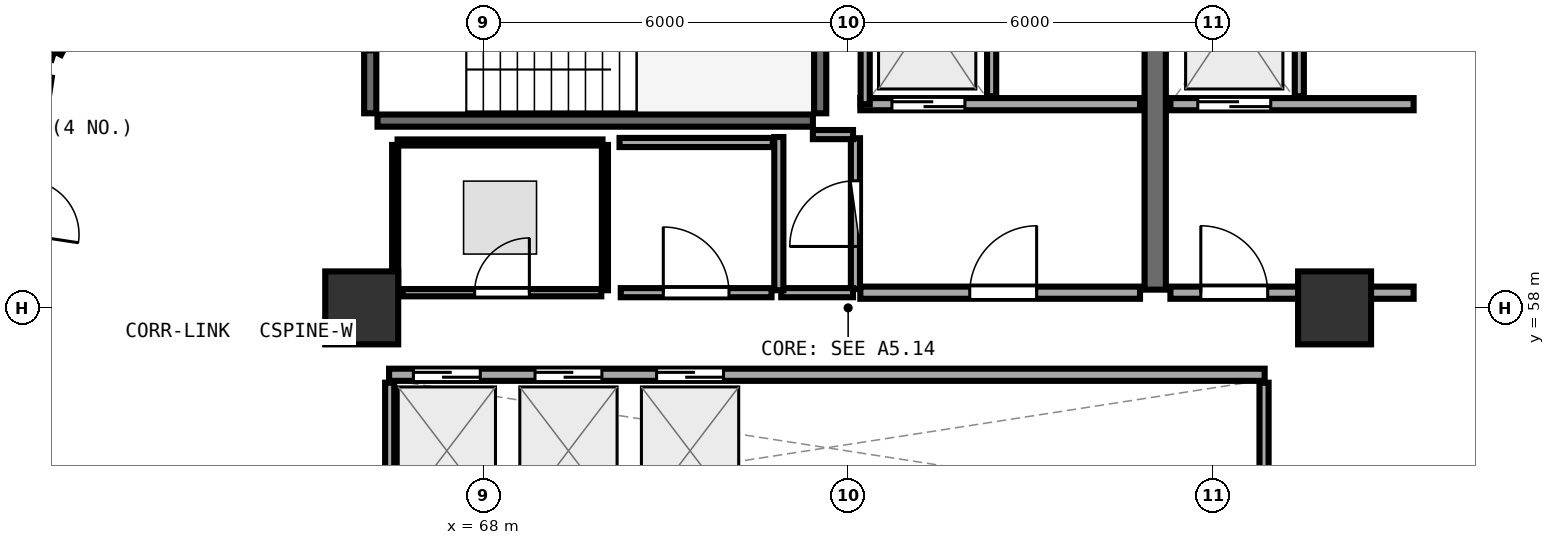
"""IFC4 building model, lengths in metres.
Left out: names, types, materials, properties, quantities, classifications, styles, units other than length and angle.
Written with IfcOpenShell. Run it as: python <this file> out.ifc"""

import sys

from ifc_helpers import new_model, si_unit, direction, frame, frame_2d, origin, origin_2d, place, context, subcontext, project, spatial, rectangle, extrude, element, fill, save


model = new_model("IFC4")
c1 = context("Model", 3, precision=1e-05, world=origin(), true_north=direction((0.0, 1.0)))
c2 = subcontext(c1, "Body", "Model", "MODEL_VIEW")
j1 = project(units=[si_unit("LENGTHUNIT", "METRE"), si_unit("PLANEANGLEUNIT", "RADIAN")], contexts=[c1])
p1 = place(None, origin())
s1 = spatial("IfcSite", under=j1, at=p1, CompositionType="ELEMENT")
p2 = place(p1, origin())
s2 = spatial("IfcBuilding", under=s1, at=p2, CompositionType="ELEMENT")
p3 = place(p2, frame((0.0, 0.0, 146.85)))
s3 = spatial("IfcBuildingStorey", under=s2, at=p3, CompositionType="ELEMENT", Elevation=146.85)
for number, where, z_axis, x_axis in (
    (1, (82.0, 58.0, 0.0), (0.0, 0.0, 1.0), (1.0, 0.0, 0.0)),
    (2, (66.0, 58.0, 0.0), (0.0, 0.0, 1.0), (1.0, 0.0, 0.0)),
):
    element("IfcColumn", number, at=place(p3, frame(where, z_axis=z_axis, x_axis=x_axis)), inside=s3, PredefinedType="PILASTER", context=c2, shape_type="SweptSolid", body=[
        extrude(rectangle(XDim=1.2, YDim=1.2, at=origin_2d()), origin(), (0.0, 0.0, 1.0), 3.75),
    ])
p4 = place(p3, frame((66.26, 61.08, 0.0), z_axis=(0.0, 0.0, 1.0), x_axis=(1.0, 0.0, 0.0)))
e3 = element("IfcWall", 3, at=p4, inside=s3, PredefinedType="SHEAR", context=c2, shape_type="SweptSolid", body=[
    extrude(rectangle(XDim=7.16, YDim=0.2, at=frame_2d((3.58, 0.0))), origin(), (0.0, 0.0, 1.0), 3.49),
])
p5 = place(p3, frame((73.54, 61.2, 0.0), z_axis=(0.0, 0.0, 1.0), x_axis=(0.0, 1.0, 0.0)))
e4 = element("IfcWall", 4, at=p5, inside=s3, PredefinedType="SHEAR", context=c2, shape_type="SweptSolid", body=[
    extrude(rectangle(XDim=3.07, YDim=0.2, at=frame_2d((1.535, 0.0))), origin(), (0.0, 0.0, 1.0), 3.49),
])
p6 = place(p3, frame((66.14, 64.27, 0.0), z_axis=(0.0, 0.0, 1.0), x_axis=(0.0, -1.0, 0.0)))
e5 = element("IfcWall", 5, at=p6, inside=s3, PredefinedType="SHEAR", context=c2, shape_type="SweptSolid", body=[
    extrude(rectangle(XDim=3.07, YDim=0.2, at=frame_2d((1.535, 0.0))), origin(), (0.0, 0.0, 1.0), 3.49),
])
p7 = place(p6, frame((1.01, 0.0, 0.0)))
e6 = element("IfcOpeningElement", 6, at=p7, cuts=e5, PredefinedType="OPENING", context=c2, shape_type="SweptSolid", body=[
    extrude(rectangle(XDim=1.05, YDim=2.1, at=frame_2d((0.525, 1.05))), frame((0.0, 0.11, 0.0), z_axis=(0.0, -1.0, 0.0), x_axis=(1.0, 0.0, 0.0)), (0.0, 0.0, 1.0), 0.22),
])
p8 = place(p3, frame((79.05, 58.3, 0.0), z_axis=(0.0, 0.0, 1.0), x_axis=(0.0, 1.0, 0.0)))
e7 = element("IfcWall", 7, at=p8, inside=s3, PredefinedType="SHEAR", context=c2, shape_type="SweptSolid", body=[
    extrude(rectangle(XDim=6.3, YDim=0.35, at=frame_2d((3.15, 0.0))), origin(), (0.0, 0.0, 1.0), 3.49),
])
p9 = place(p3, frame((74.2, 61.35, 0.0), z_axis=(0.0, 0.0, 1.0), x_axis=(1.0, 0.0, 0.0)))
e8 = element("IfcWall", 8, at=p9, inside=s3, PredefinedType="SOLIDWALL", context=c2, shape_type="SweptSolid", body=[
    extrude(rectangle(XDim=4.6, YDim=0.2, at=frame_2d((2.3, 0.0))), origin(), (0.0, 0.0, 1.0), 3.48),
])
p10 = place(p9, frame((0.52, 0.0, 0.0)))
e9 = element("IfcOpeningElement", 9, at=p10, cuts=e8, PredefinedType="OPENING", context=c2, shape_type="SweptSolid", body=[
    extrude(rectangle(XDim=1.2, YDim=2.15, at=frame_2d((0.6, 1.075))), frame((0.0, 0.11, 0.0), z_axis=(0.0, -1.0, 0.0), x_axis=(1.0, 0.0, 0.0)), (0.0, 0.0, 1.0), 0.22),
])
p11 = place(p3, frame((74.28, 61.35, 0.0), z_axis=(0.0, 0.0, 1.0), x_axis=(0.0, 1.0, 0.0)))
e10 = element("IfcWall", 10, at=p11, inside=s3, PredefinedType="PARTITIONING", context=c2, shape_type="SweptSolid", body=[
    extrude(rectangle(XDim=2.97, YDim=0.15, at=frame_2d((1.485, 0.0))), origin(), (0.0, 0.0, 1.0), 3.48),
])
p12 = place(p3, frame((76.36, 61.48, 0.0), z_axis=(0.0, 0.0, 1.0), x_axis=(0.0, 1.0, 0.0)))
e11 = element("IfcWall", 11, at=p12, inside=s3, PredefinedType="PARTITIONING", context=c2, shape_type="SweptSolid", body=[
    extrude(rectangle(XDim=2.84, YDim=0.15, at=frame_2d((1.42, 0.0))), origin(), (0.0, 0.0, 1.0), 3.48),
])
p13 = place(p3, frame((79.3, 61.35, 0.0), z_axis=(0.0, 0.0, 1.0), x_axis=(1.0, 0.0, 0.0)))
e12 = element("IfcWall", 12, at=p13, inside=s3, PredefinedType="SOLIDWALL", context=c2, shape_type="SweptSolid", body=[
    extrude(rectangle(XDim=4.0, YDim=0.2, at=frame_2d((2.0, 0.0))), origin(), (0.0, 0.0, 1.0), 2.775),
])
p14 = place(p13, frame((0.45, 0.0, 0.0)))
e13 = element("IfcOpeningElement", 13, at=p14, cuts=e12, PredefinedType="OPENING", context=c2, shape_type="SweptSolid", body=[
    extrude(rectangle(XDim=1.2, YDim=2.15, at=frame_2d((0.6, 1.075))), frame((0.0, 0.11, 0.0), z_axis=(0.0, -1.0, 0.0), x_axis=(1.0, 0.0, 0.0)), (0.0, 0.0, 1.0), 0.22),
])
p15 = place(p3, frame((81.42, 61.48, 0.0), z_axis=(0.0, 0.0, 1.0), x_axis=(0.0, 1.0, 0.0)))
e14 = element("IfcWall", 14, at=p15, inside=s3, PredefinedType="PARTITIONING", context=c2, shape_type="SweptSolid", body=[
    extrude(rectangle(XDim=2.84, YDim=0.15, at=frame_2d((1.42, 0.0))), origin(), (0.0, 0.0, 1.0), 3.48),
])
p16 = place(p3, frame((74.2, 58.25, 0.0), z_axis=(0.0, 0.0, 1.0), x_axis=(1.0, 0.0, 0.0)))
e15 = element("IfcWall", 15, at=p16, inside=s3, PredefinedType="SOLIDWALL", context=c2, shape_type="SweptSolid", body=[
    extrude(rectangle(XDim=4.6, YDim=0.2, at=frame_2d((2.3, 0.0))), origin(), (0.0, 0.0, 1.0), 3.48),
])
p17 = place(p16, frame((1.8, 0.0, 0.0)))
e16 = element("IfcOpeningElement", 16, at=p17, cuts=e15, PredefinedType="OPENING", context=c2, shape_type="SweptSolid", body=[
    extrude(rectangle(XDim=1.1, YDim=2.1, at=frame_2d((0.55, 1.05))), frame((0.0, 0.11, 0.0), z_axis=(0.0, -1.0, 0.0), x_axis=(1.0, 0.0, 0.0)), (0.0, 0.0, 1.0), 0.22),
])
p18 = place(p3, frame((79.3, 58.25, 0.0), z_axis=(0.0, 0.0, 1.0), x_axis=(1.0, 0.0, 0.0)))
e17 = element("IfcWall", 17, at=p18, inside=s3, PredefinedType="SOLIDWALL", context=c2, shape_type="SweptSolid", body=[
    extrude(rectangle(XDim=4.0, YDim=0.2, at=frame_2d((2.0, 0.0))), origin(), (0.0, 0.0, 1.0), 2.775),
])
p19 = place(p18, frame((0.5, 0.0, 0.0)))
e18 = element("IfcOpeningElement", 18, at=p19, cuts=e17, PredefinedType="OPENING", context=c2, shape_type="SweptSolid", body=[
    extrude(rectangle(XDim=1.1, YDim=2.1, at=frame_2d((0.55, 1.05))), frame((0.0, 0.11, 0.0), z_axis=(0.0, -1.0, 0.0), x_axis=(1.0, 0.0, 0.0)), (0.0, 0.0, 1.0), 0.22),
])
p20 = place(p3, frame((66.45, 56.9, 0.0), z_axis=(0.0, 0.0, 1.0), x_axis=(1.0, 0.0, 0.0)))
e19 = element("IfcWall", 19, at=p20, inside=s3, PredefinedType="SOLIDWALL", context=c2, shape_type="SweptSolid", body=[
    extrude(rectangle(XDim=14.4, YDim=0.2, at=frame_2d((7.2, 0.0))), origin(), (0.0, 0.0, 1.0), 3.48),
])
p21 = place(p20, frame((0.4, 0.0, 0.0)))
e20 = element("IfcOpeningElement", 20, at=p21, cuts=e19, PredefinedType="OPENING", context=c2, shape_type="SweptSolid", body=[
    extrude(rectangle(XDim=1.1, YDim=2.1, at=frame_2d((0.55, 1.05))), frame((0.0, 0.11, 0.0), z_axis=(0.0, -1.0, 0.0), x_axis=(1.0, 0.0, 0.0)), (0.0, 0.0, 1.0), 0.22),
])
p22 = place(p20, frame((2.4, 0.0, 0.0)))
e21 = element("IfcOpeningElement", 21, at=p22, cuts=e19, PredefinedType="OPENING", context=c2, shape_type="SweptSolid", body=[
    extrude(rectangle(XDim=1.1, YDim=2.1, at=frame_2d((0.55, 1.05))), frame((0.0, 0.11, 0.0), z_axis=(0.0, -1.0, 0.0), x_axis=(1.0, 0.0, 0.0)), (0.0, 0.0, 1.0), 0.22),
])
p23 = place(p20, frame((4.4, 0.0, 0.0)))
e22 = element("IfcOpeningElement", 22, at=p23, cuts=e19, PredefinedType="OPENING", context=c2, shape_type="SweptSolid", body=[
    extrude(rectangle(XDim=1.1, YDim=2.1, at=frame_2d((0.55, 1.05))), frame((0.0, 0.11, 0.0), z_axis=(0.0, -1.0, 0.0), x_axis=(1.0, 0.0, 0.0)), (0.0, 0.0, 1.0), 0.22),
])
for number, where, z_axis, x_axis in (
    (23, (66.46, 54.48, 0.0), (0.0, 0.0, 1.0), (0.0, 1.0, 0.0)),
    (24, (80.84, 54.48, 0.0), (0.0, 0.0, 1.0), (0.0, 1.0, 0.0)),
):
    element("IfcWall", number, at=place(p3, frame(where, z_axis=z_axis, x_axis=x_axis)), inside=s3, PredefinedType="PARTITIONING", context=c2, shape_type="SweptSolid", body=[
        extrude(rectangle(XDim=2.29, YDim=0.15, at=frame_2d((1.145, 0.0))), origin(), (0.0, 0.0, 1.0), 3.48),
    ])
p24 = place(p3, frame((74.12, 58.31, 0.0), z_axis=(0.0, 0.0, 1.0), x_axis=(0.0, 1.0, 0.0)))
e25 = element("IfcWall", 25, at=p24, inside=s3, PredefinedType="PARTITIONING", context=c2, shape_type="SweptSolid", body=[
    extrude(rectangle(XDim=2.48, YDim=0.15, at=frame_2d((1.24, 0.0))), origin(), (0.0, 0.0, 1.0), 3.48),
])
p25 = place(p24, frame((0.7, 0.0, 0.0)))
e26 = element("IfcOpeningElement", 26, at=p25, cuts=e25, PredefinedType="OPENING", context=c2, shape_type="SweptSolid", body=[
    extrude(rectangle(XDim=1.08, YDim=2.1, at=frame_2d((0.54, 1.05))), frame((0.0, 0.085, 0.0), z_axis=(0.0, -1.0, 0.0), x_axis=(1.0, 0.0, 0.0)), (0.0, 0.0, 1.0), 0.17),
])
p26 = place(p3, frame((66.675, 58.25, 0.0), z_axis=(0.0, 0.0, 1.0), x_axis=(1.0, 0.0, 0.0)))
e27 = element("IfcWall", 27, at=p26, inside=s3, PredefinedType="PARTITIONING", context=c2, shape_type="SweptSolid", body=[
    extrude(rectangle(XDim=3.265, YDim=0.12, at=frame_2d((1.632, 0.0))), origin(), (0.0, 0.0, 1.0), 3.48),
])
p27 = place(p26, frame((1.182, 0.0, 0.0)))
e28 = element("IfcOpeningElement", 28, at=p27, cuts=e27, PredefinedType="OPENING", context=c2, shape_type="SweptSolid", body=[
    extrude(rectangle(XDim=0.9, YDim=2.08, at=frame_2d((0.45, 1.04))), frame((0.0, 0.07, 0.0), z_axis=(0.0, -1.0, 0.0), x_axis=(1.0, 0.0, 0.0)), (0.0, 0.0, 1.0), 0.14),
])
p28 = place(p3, frame((70.26, 58.25, 0.0), z_axis=(0.0, 0.0, 1.0), x_axis=(1.0, 0.0, 0.0)))
e29 = element("IfcWall", 29, at=p28, inside=s3, PredefinedType="PARTITIONING", context=c2, shape_type="SweptSolid", body=[
    extrude(rectangle(XDim=2.48, YDim=0.15, at=frame_2d((1.24, 0.0))), origin(), (0.0, 0.0, 1.0), 3.48),
])
p29 = place(p28, frame((0.7, 0.0, 0.0)))
e30 = element("IfcOpeningElement", 30, at=p29, cuts=e29, PredefinedType="OPENING", context=c2, shape_type="SweptSolid", body=[
    extrude(rectangle(XDim=1.08, YDim=2.1, at=frame_2d((0.54, 1.05))), frame((0.0, 0.085, 0.0), z_axis=(0.0, -1.0, 0.0), x_axis=(1.0, 0.0, 0.0)), (0.0, 0.0, 1.0), 0.17),
])
p30 = place(p3, frame((62.015, 64.192, 0.0), z_axis=(0.0, 0.0, 1.0), x_axis=(-0.457234963971, -0.889345932538, 0.0)))
e31 = element("IfcWall", 31, at=p30, inside=s3, PredefinedType="PARTITIONING", context=c2, shape_type="SweptSolid", body=[
    extrude(rectangle(XDim=2.245, YDim=0.15, at=frame_2d((1.122, 0.0))), origin(), (0.0, 0.0, 1.0), 3.235),
])
p31 = place(p30, frame((0.647, 0.0, 0.0)))
e32 = element("IfcOpeningElement", 32, at=p31, cuts=e31, PredefinedType="OPENING", context=c2, shape_type="SweptSolid", body=[
    extrude(rectangle(XDim=0.95, YDim=2.08, at=frame_2d((0.475, 1.04))), frame((0.0, 0.085, 0.0), z_axis=(0.0, -1.0, 0.0), x_axis=(1.0, 0.0, 0.0)), (0.0, 0.0, 1.0), 0.17),
])
p32 = place(p3, frame((60.843, 61.796, 0.0), z_axis=(0.0, 0.0, 1.0), x_axis=(-0.149807046494, -0.988715251638, 0.0)))
e33 = element("IfcWall", 33, at=p32, inside=s3, PredefinedType="PARTITIONING", context=c2, shape_type="SweptSolid", body=[
    extrude(rectangle(XDim=4.338, YDim=0.12, at=frame_2d((2.169, 0.0))), origin(), (0.0, 0.0, 1.0), 2.975),
])
p33 = place(p32, frame((1.719, 0.0, 0.0)))
e34 = element("IfcOpeningElement", 34, at=p33, cuts=e33, PredefinedType="OPENING", context=c2, shape_type="SweptSolid", body=[
    extrude(rectangle(XDim=0.9, YDim=2.08, at=frame_2d((0.45, 1.04))), frame((0.0, 0.07, 0.0), z_axis=(0.0, -1.0, 0.0), x_axis=(1.0, 0.0, 0.0)), (0.0, 0.0, 1.0), 0.14),
])
p34 = place(p3, frame((72.9, 58.25, 0.0), z_axis=(0.0, 0.0, 1.0), x_axis=(1.0, 0.0, 0.0)))
e35 = element("IfcWall", 35, at=p34, inside=s3, PredefinedType="PARTITIONING", context=c2, shape_type="SweptSolid", body=[
    extrude(rectangle(XDim=1.18, YDim=0.15, at=frame_2d((0.59, 0.0))), origin(), (0.0, 0.0, 1.0), 3.48),
])
p35 = place(p3, frame((74.08, 60.85, 0.0), z_axis=(0.0, 0.0, 1.0), x_axis=(-1.0, 0.0, 0.0)))
e36 = element("IfcWall", 36, at=p35, inside=s3, PredefinedType="PARTITIONING", context=c2, shape_type="SweptSolid", body=[
    extrude(rectangle(XDim=0.66, YDim=0.15, at=frame_2d((0.33, 0.0))), origin(), (0.0, 0.0, 1.0), 3.48),
])
p36 = place(p3, frame((72.86, 60.81, 0.0), z_axis=(0.0, 0.0, 1.0), x_axis=(0.0, -1.0, 0.0)))
e37 = element("IfcWall", 37, at=p36, inside=s3, PredefinedType="PARTITIONING", context=c2, shape_type="SweptSolid", body=[
    extrude(rectangle(XDim=2.52, YDim=0.15, at=frame_2d((1.26, 0.0))), origin(), (0.0, 0.0, 1.0), 3.48),
])
p37 = place(p3, frame((70.0, 58.29, 0.0), z_axis=(0.0, 0.0, 1.0), x_axis=(0.0, 1.0, 0.0)))
e38 = element("IfcWall", 38, at=p37, inside=s3, PredefinedType="PARTITIONING", context=c2, shape_type="SweptSolid", body=[
    extrude(rectangle(XDim=2.39, YDim=0.1, at=frame_2d((1.195, 0.0))), origin(), (0.0, 0.0, 1.0), 3.48),
])
p38 = place(p3, frame((69.96, 60.72, 0.0), z_axis=(0.0, 0.0, 1.0), x_axis=(-1.0, 0.0, 0.0)))
e39 = element("IfcWall", 39, at=p38, inside=s3, PredefinedType="PARTITIONING", context=c2, shape_type="SweptSolid", body=[
    extrude(rectangle(XDim=3.37, YDim=0.1, at=frame_2d((1.685, 0.0))), origin(), (0.0, 0.0, 1.0), 3.48),
])
p39 = place(p3, frame((66.55, 60.68, 0.0), z_axis=(0.0, 0.0, 1.0), x_axis=(0.0, -1.0, 0.0)))
e40 = element("IfcWall", 40, at=p39, inside=s3, PredefinedType="PARTITIONING", context=c2, shape_type="SweptSolid", body=[
    extrude(rectangle(XDim=2.383, YDim=0.1, at=frame_2d((1.191, 0.0))), origin(), (0.0, 0.0, 1.0), 3.48),
])
p40 = place(p3, frame((72.76, 60.72, 0.0), z_axis=(0.0, 0.0, 1.0), x_axis=(-1.0, 0.0, 0.0)))
e41 = element("IfcWall", 41, at=p40, inside=s3, PredefinedType="PARTITIONING", context=c2, shape_type="SweptSolid", body=[
    extrude(rectangle(XDim=2.52, YDim=0.15, at=frame_2d((1.26, 0.0))), origin(), (0.0, 0.0, 1.0), 3.48),
])
p41 = place(p3, frame((87.032, 62.129, 0.0), z_axis=(0.0, 0.0, 1.0), x_axis=(-0.619933209612, 0.784654583636, 0.0)))
e42 = element("IfcWall", 42, at=p41, inside=s3, PredefinedType="PARTITIONING", context=c2, shape_type="SweptSolid", body=[
    extrude(rectangle(XDim=7.095, YDim=0.1, at=frame_2d((3.547, 0.0))), origin(), (0.0, 0.0, 1.0), 2.975),
])
p42 = place(p3, frame((60.923, 62.154, 0.0), z_axis=(0.0, 0.0, 1.0), x_axis=(-0.952653075659, 0.304059397878, 0.0)))
e43 = element("IfcWall", 43, at=p42, inside=s3, PredefinedType="PARTITIONING", context=c2, shape_type="SweptSolid", body=[
    extrude(rectangle(XDim=7.112, YDim=0.15, at=frame_2d((3.556, 0.0))), origin(), (0.0, 0.0, 1.0), 3.175),
])
p43 = place(p10, origin())
e44 = element("IfcDoor", 44, at=p43, inside=s3, OperationType="DOUBLE_DOOR_SLIDING", PredefinedType="DOOR", context=c2, shape_type="SweptSolid", body=[
    extrude(rectangle(XDim=1.2, YDim=2.15, at=frame_2d((0.6, 1.075))), frame((0.0, 0.025, 0.0), z_axis=(0.0, -1.0, 0.0), x_axis=(1.0, 0.0, 0.0)), (0.0, 0.0, 1.0), 0.05),
])
fill(e9, e44)
p44 = place(p14, origin())
e45 = element("IfcDoor", 45, at=p44, inside=s3, OperationType="DOUBLE_DOOR_SLIDING", PredefinedType="DOOR", context=c2, shape_type="SweptSolid", body=[
    extrude(rectangle(XDim=1.2, YDim=2.15, at=frame_2d((0.6, 1.075))), frame((0.0, 0.025, 0.0), z_axis=(0.0, -1.0, 0.0), x_axis=(1.0, 0.0, 0.0)), (0.0, 0.0, 1.0), 0.05),
])
fill(e13, e45)
p45 = place(p17, frame((1.1, 0.0, 0.0), z_axis=(0.0, 0.0, 1.0), x_axis=(-1.0, 0.0, 0.0)))
e46 = element("IfcDoor", 46, at=p45, inside=s3, OperationType="SINGLE_SWING_LEFT", PredefinedType="DOOR", context=c2, shape_type="SweptSolid", body=[
    extrude(rectangle(XDim=1.1, YDim=2.1, at=frame_2d((0.55, 1.05))), frame((0.0, 0.025, 0.0), z_axis=(0.0, -1.0, 0.0), x_axis=(1.0, 0.0, 0.0)), (0.0, 0.0, 1.0), 0.05),
])
fill(e16, e46)
p46 = place(p19, frame((1.1, 0.0, 0.0), z_axis=(0.0, 0.0, 1.0), x_axis=(-1.0, 0.0, 0.0)))
e47 = element("IfcDoor", 47, at=p46, inside=s3, OperationType="SINGLE_SWING_RIGHT", PredefinedType="DOOR", context=c2, shape_type="SweptSolid", body=[
    extrude(rectangle(XDim=1.1, YDim=2.1, at=frame_2d((0.55, 1.05))), frame((0.0, 0.025, 0.0), z_axis=(0.0, -1.0, 0.0), x_axis=(1.0, 0.0, 0.0)), (0.0, 0.0, 1.0), 0.05),
])
fill(e18, e47)
p47 = place(p21, origin())
e48 = element("IfcDoor", 48, at=p47, inside=s3, OperationType="DOUBLE_DOOR_SLIDING", PredefinedType="DOOR", context=c2, shape_type="SweptSolid", body=[
    extrude(rectangle(XDim=1.1, YDim=2.1, at=frame_2d((0.55, 1.05))), frame((0.0, 0.025, 0.0), z_axis=(0.0, -1.0, 0.0), x_axis=(1.0, 0.0, 0.0)), (0.0, 0.0, 1.0), 0.05),
])
fill(e20, e48)
p48 = place(p22, origin())
e49 = element("IfcDoor", 49, at=p48, inside=s3, OperationType="DOUBLE_DOOR_SLIDING", PredefinedType="DOOR", context=c2, shape_type="SweptSolid", body=[
    extrude(rectangle(XDim=1.1, YDim=2.1, at=frame_2d((0.55, 1.05))), frame((0.0, 0.025, 0.0), z_axis=(0.0, -1.0, 0.0), x_axis=(1.0, 0.0, 0.0)), (0.0, 0.0, 1.0), 0.05),
])
fill(e21, e49)
p49 = place(p23, origin())
e50 = element("IfcDoor", 50, at=p49, inside=s3, OperationType="DOUBLE_DOOR_SLIDING", PredefinedType="DOOR", context=c2, shape_type="SweptSolid", body=[
    extrude(rectangle(XDim=1.1, YDim=2.1, at=frame_2d((0.55, 1.05))), frame((0.0, 0.025, 0.0), z_axis=(0.0, -1.0, 0.0), x_axis=(1.0, 0.0, 0.0)), (0.0, 0.0, 1.0), 0.05),
])
fill(e22, e50)
p50 = place(p25, origin())
e51 = element("IfcDoor", 51, at=p50, inside=s3, OperationType="SINGLE_SWING_LEFT", PredefinedType="DOOR", context=c2, shape_type="SweptSolid", body=[
    extrude(rectangle(XDim=1.08, YDim=2.1, at=frame_2d((0.54, 1.05))), frame((0.0, 0.025, 0.0), z_axis=(0.0, -1.0, 0.0), x_axis=(1.0, 0.0, 0.0)), (0.0, 0.0, 1.0), 0.05),
])
fill(e26, e51)
p51 = place(p27, origin())
e52 = element("IfcDoor", 52, at=p51, inside=s3, OperationType="SINGLE_SWING_RIGHT", PredefinedType="DOOR", context=c2, shape_type="SweptSolid", body=[
    extrude(rectangle(XDim=0.9, YDim=2.08, at=frame_2d((0.45, 1.04))), frame((0.0, 0.025, 0.0), z_axis=(0.0, -1.0, 0.0), x_axis=(1.0, 0.0, 0.0)), (0.0, 0.0, 1.0), 0.05),
])
fill(e28, e52)
p52 = place(p29, origin())
e53 = element("IfcDoor", 53, at=p52, inside=s3, OperationType="SINGLE_SWING_LEFT", PredefinedType="DOOR", context=c2, shape_type="SweptSolid", body=[
    extrude(rectangle(XDim=1.08, YDim=2.1, at=frame_2d((0.54, 1.05))), frame((0.0, 0.025, 0.0), z_axis=(0.0, -1.0, 0.0), x_axis=(1.0, 0.0, 0.0)), (0.0, 0.0, 1.0), 0.05),
])
fill(e30, e53)
save(model, sys.argv[1])
